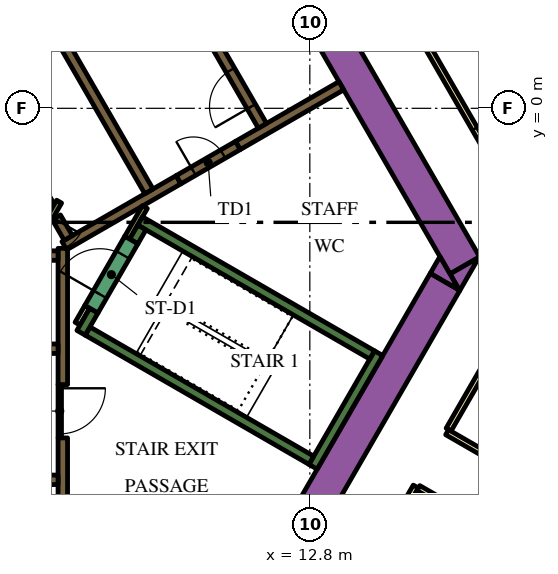
"""IFC4 building model, lengths in metres.
Left out: names, types, materials, properties, quantities, classifications, styles, units other than length and angle.
Written with IfcOpenShell. Run it as: python <this file> out.ifc"""

import sys

from ifc_helpers import new_model, si_unit, direction, frame, frame_2d, origin, place, context, subcontext, project, spatial, polyline, rectangle, outline, extrude, element, fill, save


model = new_model("IFC4")
c1 = context("Model", 3, precision=1e-05, world=origin(), true_north=direction((0.0, 1.0)))
c2 = subcontext(c1, "Body", "Model", "MODEL_VIEW")
j1 = project(units=[si_unit("LENGTHUNIT", "METRE"), si_unit("PLANEANGLEUNIT", "RADIAN")], contexts=[c1])
p1 = place(None, origin())
s1 = spatial("IfcSite", under=j1, at=p1, CompositionType="ELEMENT")
p2 = place(p1, origin())
s2 = spatial("IfcBuilding", under=s1, at=p2, CompositionType="ELEMENT")
p3 = place(p2, frame((0.0, 0.0, 74.4)))
s3 = spatial("IfcBuildingStorey", under=s2, at=p3, CompositionType="ELEMENT", Elevation=74.4)
p4 = place(p3, frame((6.461, 13.909, 0.0), z_axis=(0.0, 0.0, 1.0), x_axis=(0.500005804227, -0.866022052686, 0.0)))
e1 = element("IfcWall", 1, at=p4, inside=s3, PredefinedType="SOLIDWALL", context=c2, shape_type="SweptSolid", body=[
    extrude(rectangle(XDim=20.834, YDim=0.9, at=frame_2d((10.417, 0.0))), origin(), (0.0, 0.0, 1.0), 3.9),
])
p5 = place(p3, origin())
e2 = element("IfcWall", 2, at=p5, inside=s3, PredefinedType="SOLIDWALL", context=c2, shape_type="SweptSolid", body=[
    extrude(outline(polyline([(16.743, -4.8), (16.489, -4.36), (17.251, -3.92), (16.743, -4.8)])), origin(), (0.0, 0.0, 1.0), 3.9),
])
p6 = place(p3, frame((11.695, -12.644, 0.0), z_axis=(0.0, 0.0, 1.0), x_axis=(0.500010229568, 0.86601949766, 0.0)))
e3 = element("IfcWall", 3, at=p6, inside=s3, PredefinedType="SOLIDWALL", context=c2, shape_type="SweptSolid", body=[
    extrude(rectangle(XDim=9.326, YDim=0.9, at=frame_2d((4.663, 0.0))), origin(), (0.0, 0.0, 1.0), 3.9),
])
e4 = element("IfcWall", 4, at=p5, inside=s3, PredefinedType="SOLIDWALL", context=c2, shape_type="SweptSolid", body=[
    extrude(outline(polyline([(16.223, -3.9), (16.732, -4.78), (15.969, -4.34), (16.223, -3.9)])), origin(), (0.0, 0.0, 1.0), 3.9),
])
p7 = place(p3, frame((12.885, -9.431, 0.0), z_axis=(0.0, 0.0, 1.0), x_axis=(0.500020560727, 0.866013532718, 0.0)))
e5 = element("IfcWall", 5, at=p7, inside=s3, PredefinedType="SOLIDWALL", context=c2, shape_type="SweptSolid", body=[
    extrude(rectangle(XDim=3.45, YDim=0.25, at=frame_2d((1.725, 0.0))), origin(), (0.0, 0.0, 1.0), 3.9),
])
p8 = place(p3, frame((12.84, -9.261, 0.0), z_axis=(0.0, 0.0, 1.0), x_axis=(-0.866013990052, 0.500019768644, 0.0)))
e6 = element("IfcWall", 6, at=p8, inside=s3, PredefinedType="SOLIDWALL", context=c2, shape_type="SweptSolid", body=[
    extrude(rectangle(XDim=6.8, YDim=0.25, at=frame_2d((3.4, 0.0))), origin(), (0.0, 0.0, 1.0), 3.9),
])
p9 = place(p3, frame((6.78, -5.906, 0.0), z_axis=(0.0, 0.0, 1.0), x_axis=(0.500223362819, 0.865896406789, 0.0)))
e7 = element("IfcWall", 7, at=p9, inside=s3, PredefinedType="SOLIDWALL", context=c2, shape_type="SweptSolid", body=[
    extrude(rectangle(XDim=0.675, YDim=0.25, at=frame_2d((0.337, 0.0))), origin(), (0.0, 0.0, 1.0), 3.9),
])
p10 = place(p3, frame((8.334, -2.964, 0.0), z_axis=(0.0, 0.0, 1.0), x_axis=(0.866016039709, -0.500016218704, 0.0)))
e8 = element("IfcWall", 8, at=p10, inside=s3, PredefinedType="SOLIDWALL", context=c2, shape_type="SweptSolid", body=[
    extrude(rectangle(XDim=7.05, YDim=0.25, at=frame_2d((3.525, 0.0))), origin(), (0.0, 0.0, 1.0), 3.9),
])
p11 = place(p3, frame((8.168, -3.503, 0.0), z_axis=(0.0, 0.0, 1.0), x_axis=(0.49972245349, 0.866185586049, 0.0)))
e9 = element("IfcWall", 9, at=p11, inside=s3, PredefinedType="SOLIDWALL", context=c2, shape_type="SweptSolid", body=[
    extrude(rectangle(XDim=0.425, YDim=0.25, at=frame_2d((0.212, 0.0))), origin(), (0.0, 0.0, 1.0), 3.9),
])
p12 = place(p3, frame((6.3, -7.27, 0.0), z_axis=(0.0, 0.0, 1.0), x_axis=(0.0, 1.0, 0.0)))
e10 = element("IfcWall", 10, at=p12, inside=s3, PredefinedType="SOLIDWALL", context=c2, shape_type="SweptSolid", body=[
    extrude(rectangle(XDim=3.586, YDim=0.25, at=frame_2d((1.793, 0.0))), origin(), (0.0, 0.0, 1.0), 3.9),
])
p13 = place(p3, frame((6.3, -12.1, 0.0), z_axis=(0.0, 0.0, 1.0), x_axis=(0.0, 1.0, 0.0)))
e11 = element("IfcWall", 11, at=p13, inside=s3, PredefinedType="SOLIDWALL", context=c2, shape_type="SweptSolid", body=[
    extrude(rectangle(XDim=3.428, YDim=0.25, at=frame_2d((1.714, 0.0))), origin(), (0.0, 0.0, 1.0), 3.9),
])
p14 = place(p3, frame((5.538, -3.875, 0.0), z_axis=(0.0, 0.0, 1.0), x_axis=(1.0, 0.0, 0.0)))
e12 = element("IfcWall", 12, at=p14, inside=s3, PredefinedType="SOLIDWALL", context=c2, shape_type="SweptSolid", body=[
    extrude(rectangle(XDim=0.637, YDim=0.25, at=frame_2d((0.318, 0.0))), origin(), (0.0, 0.0, 1.0), 3.9),
])
p15 = place(p3, frame((13.629, 0.594, 0.0), z_axis=(0.0, 0.0, 1.0), x_axis=(-0.86602790099, -0.499995674689, 0.0)))
e13 = element("IfcWall", 13, at=p15, inside=s3, PredefinedType="SOLIDWALL", context=c2, shape_type="SweptSolid", body=[
    extrude(rectangle(XDim=3.146, YDim=0.25, at=frame_2d((1.573, 0.0))), origin(), (0.0, 0.0, 1.0), 3.9),
])
p16 = place(p3, frame((9.346, -1.879, 0.0), z_axis=(0.0, 0.0, 1.0), x_axis=(-0.866048528039, -0.499959945477, 0.0)))
e14 = element("IfcWall", 14, at=p16, inside=s3, PredefinedType="SOLIDWALL", context=c2, shape_type="SweptSolid", body=[
    extrude(rectangle(XDim=3.47, YDim=0.25, at=frame_2d((1.735, 0.0))), origin(), (0.0, 0.0, 1.0), 3.9),
])
p17 = place(p3, frame((6.13, -2.867, 0.0), z_axis=(0.0, 0.0, 1.0), x_axis=(0.500160776593, -0.865932559475, 0.0)))
e15 = element("IfcWall", 15, at=p17, inside=s3, PredefinedType="SOLIDWALL", context=c2, shape_type="SweptSolid", body=[
    extrude(rectangle(XDim=0.627, YDim=0.25, at=frame_2d((0.313, 0.0))), origin(), (0.0, 0.0, 1.0), 3.9),
])
p18 = place(p3, frame((5.97, -2.591, 0.0), z_axis=(0.0, 0.0, 1.0), x_axis=(-0.499994469932, 0.866028596547, 0.0)))
e16 = element("IfcWall", 16, at=p18, inside=s3, PredefinedType="SOLIDWALL", context=c2, shape_type="SweptSolid", body=[
    extrude(rectangle(XDim=10.488, YDim=0.25, at=frame_2d((5.244, 0.0))), origin(), (0.0, 0.0, 1.0), 3.9),
])
p19 = place(p3, frame((6.945, -5.222, 0.0), z_axis=(0.0, 0.0, 1.0), x_axis=(-0.499818422106, -0.866130212453, 0.0)))
e17 = element("IfcWall", 17, at=p19, inside=s3, PredefinedType="PARTITIONING", context=c2, shape_type="SweptSolid", body=[
    extrude(rectangle(XDim=0.514, YDim=0.15, at=frame_2d((0.257, 0.0))), origin(), (0.0, 0.0, 1.0), 2.7),
])
p20 = place(p3, frame((8.459, -2.599, 0.0), z_axis=(0.0, 0.0, 1.0), x_axis=(-0.500041054325, -0.866001699761, 0.0)))
e18 = element("IfcWall", 18, at=p20, inside=s3, PredefinedType="PARTITIONING", context=c2, shape_type="SweptSolid", body=[
    extrude(rectangle(XDim=0.929, YDim=0.15, at=frame_2d((0.464, 0.0))), origin(), (0.0, 0.0, 1.0), 3.9),
])
p21 = place(p3, frame((-6.175, -9.775, 0.0), z_axis=(0.0, 0.0, 1.0), x_axis=(1.0, 0.0, 0.0)))
e19 = element("IfcWall", 19, at=p21, inside=s3, PredefinedType="SOLIDWALL", context=c2, shape_type="SweptSolid", body=[
    extrude(rectangle(XDim=12.35, YDim=0.25, at=frame_2d((6.175, 0.0))), origin(), (0.0, 0.0, 1.0), 3.9),
])
p22 = place(p21, frame((0.585, 0.0, 0.0)))
e20 = element("IfcOpeningElement", 20, at=p22, cuts=e19, PredefinedType="OPENING", context=c2, shape_type="SweptSolid", body=[
    extrude(rectangle(XDim=1.1, YDim=2.1, at=frame_2d((0.55, 1.05))), frame((0.0, 0.135, 0.0), z_axis=(0.0, -1.0, 0.0), x_axis=(1.0, 0.0, 0.0)), (0.0, 0.0, 1.0), 0.27),
])
p23 = place(p21, frame((3.105, 0.0, 0.0)))
e21 = element("IfcOpeningElement", 21, at=p23, cuts=e19, PredefinedType="OPENING", context=c2, shape_type="SweptSolid", body=[
    extrude(rectangle(XDim=1.1, YDim=2.1, at=frame_2d((0.55, 1.05))), frame((0.0, 0.135, 0.0), z_axis=(0.0, -1.0, 0.0), x_axis=(1.0, 0.0, 0.0)), (0.0, 0.0, 1.0), 0.27),
])
p24 = place(p21, frame((5.625, 0.0, 0.0)))
e22 = element("IfcOpeningElement", 22, at=p24, cuts=e19, PredefinedType="OPENING", context=c2, shape_type="SweptSolid", body=[
    extrude(rectangle(XDim=1.1, YDim=2.1, at=frame_2d((0.55, 1.05))), frame((0.0, 0.135, 0.0), z_axis=(0.0, -1.0, 0.0), x_axis=(1.0, 0.0, 0.0)), (0.0, 0.0, 1.0), 0.27),
])
p25 = place(p21, frame((8.145, 0.0, 0.0)))
e23 = element("IfcOpeningElement", 23, at=p25, cuts=e19, PredefinedType="OPENING", context=c2, shape_type="SweptSolid", body=[
    extrude(rectangle(XDim=1.1, YDim=2.1, at=frame_2d((0.55, 1.05))), frame((0.0, 0.135, 0.0), z_axis=(0.0, -1.0, 0.0), x_axis=(1.0, 0.0, 0.0)), (0.0, 0.0, 1.0), 0.27),
])
p26 = place(p21, frame((10.665, 0.0, 0.0)))
e24 = element("IfcOpeningElement", 24, at=p26, cuts=e19, PredefinedType="OPENING", context=c2, shape_type="SweptSolid", body=[
    extrude(rectangle(XDim=1.1, YDim=2.1, at=frame_2d((0.55, 1.05))), frame((0.0, 0.135, 0.0), z_axis=(0.0, -1.0, 0.0), x_axis=(1.0, 0.0, 0.0)), (0.0, 0.0, 1.0), 0.27),
])
p27 = place(p3, frame((-6.175, -6.325, 0.0), z_axis=(0.0, 0.0, 1.0), x_axis=(1.0, 0.0, 0.0)))
e25 = element("IfcWall", 25, at=p27, inside=s3, PredefinedType="SOLIDWALL", context=c2, shape_type="SweptSolid", body=[
    extrude(rectangle(XDim=12.35, YDim=0.25, at=frame_2d((6.175, 0.0))), origin(), (0.0, 0.0, 1.0), 3.9),
])
p28 = place(p27, frame((3.205, 0.0, 0.0)))
e26 = element("IfcOpeningElement", 26, at=p28, cuts=e25, PredefinedType="OPENING", context=c2, shape_type="SweptSolid", body=[
    extrude(rectangle(XDim=0.9, YDim=2.1, at=frame_2d((0.45, 1.05))), frame((0.0, 0.135, 0.0), z_axis=(0.0, -1.0, 0.0), x_axis=(1.0, 0.0, 0.0)), (0.0, 0.0, 1.0), 0.27),
])
p29 = place(p27, frame((8.145, 0.0, 0.0)))
e27 = element("IfcOpeningElement", 27, at=p29, cuts=e25, PredefinedType="OPENING", context=c2, shape_type="SweptSolid", body=[
    extrude(rectangle(XDim=1.1, YDim=2.1, at=frame_2d((0.55, 1.05))), frame((0.0, 0.135, 0.0), z_axis=(0.0, -1.0, 0.0), x_axis=(1.0, 0.0, 0.0)), (0.0, 0.0, 1.0), 0.27),
])
p30 = place(p27, frame((10.665, 0.0, 0.0)))
e28 = element("IfcOpeningElement", 28, at=p30, cuts=e25, PredefinedType="OPENING", context=c2, shape_type="SweptSolid", body=[
    extrude(rectangle(XDim=1.1, YDim=2.1, at=frame_2d((0.55, 1.05))), frame((0.0, 0.135, 0.0), z_axis=(0.0, -1.0, 0.0), x_axis=(1.0, 0.0, 0.0)), (0.0, 0.0, 1.0), 0.27),
])
p31 = place(p3, frame((11.553, -0.46, 0.0), z_axis=(0.0, 0.0, 1.0), x_axis=(-0.500006514828, 0.866021642414, 0.0)))
e29 = element("IfcWall", 29, at=p31, inside=s3, PredefinedType="SOLIDWALL", context=c2, shape_type="SweptSolid", body=[
    extrude(rectangle(XDim=12.35, YDim=0.25, at=frame_2d((6.175, 0.0))), origin(), (0.0, 0.0, 1.0), 3.9),
])
p32 = place(p31, frame((0.585, 0.0, 0.0)))
e30 = element("IfcOpeningElement", 30, at=p32, cuts=e29, PredefinedType="OPENING", context=c2, shape_type="SweptSolid", body=[
    extrude(rectangle(XDim=1.1, YDim=2.1, at=frame_2d((0.55, 1.05))), frame((0.0, 0.135, 0.0), z_axis=(0.0, -1.0, 0.0), x_axis=(1.0, 0.0, 0.0)), (0.0, 0.0, 1.0), 0.27),
])
p33 = place(p31, frame((3.105, 0.0, 0.0)))
e31 = element("IfcOpeningElement", 31, at=p33, cuts=e29, PredefinedType="OPENING", context=c2, shape_type="SweptSolid", body=[
    extrude(rectangle(XDim=1.1, YDim=2.1, at=frame_2d((0.55, 1.05))), frame((0.0, 0.135, 0.0), z_axis=(0.0, -1.0, 0.0), x_axis=(1.0, 0.0, 0.0)), (0.0, 0.0, 1.0), 0.27),
])
p34 = place(p31, frame((5.625, 0.0, 0.0)))
e32 = element("IfcOpeningElement", 32, at=p34, cuts=e29, PredefinedType="OPENING", context=c2, shape_type="SweptSolid", body=[
    extrude(rectangle(XDim=1.1, YDim=2.1, at=frame_2d((0.55, 1.05))), frame((0.0, 0.135, 0.0), z_axis=(0.0, -1.0, 0.0), x_axis=(1.0, 0.0, 0.0)), (0.0, 0.0, 1.0), 0.27),
])
p35 = place(p3, frame((8.565, -2.185, 0.0), z_axis=(0.0, 0.0, 1.0), x_axis=(-0.499997954832, 0.866026584559, 0.0)))
e33 = element("IfcWall", 33, at=p35, inside=s3, PredefinedType="SOLIDWALL", context=c2, shape_type="SweptSolid", body=[
    extrude(rectangle(XDim=12.35, YDim=0.25, at=frame_2d((6.175, 0.0))), origin(), (0.0, 0.0, 1.0), 3.9),
])
p36 = place(p35, frame((5.725, 0.0, 0.0)))
e34 = element("IfcOpeningElement", 34, at=p36, cuts=e33, PredefinedType="OPENING", context=c2, shape_type="SweptSolid", body=[
    extrude(rectangle(XDim=0.9, YDim=2.1, at=frame_2d((0.45, 1.05))), frame((0.0, 0.135, 0.0), z_axis=(0.0, -1.0, 0.0), x_axis=(1.0, 0.0, 0.0)), (0.0, 0.0, 1.0), 0.27),
])
p37 = place(p3, frame((7.053, -5.284, 0.0), z_axis=(0.0, 0.0, 1.0), x_axis=(0.500078061341, 0.865980330357, 0.0)))
e35 = element("IfcWall", 35, at=p37, inside=s3, PredefinedType="SOLIDWALL", context=c2, shape_type="SweptSolid", body=[
    extrude(rectangle(XDim=2.1, YDim=0.4, at=frame_2d((1.05, 0.0))), origin(), (0.0, 0.0, 1.0), 3.9),
])
p38 = place(p37, frame((0.45, 0.0, 0.0)))
e36 = element("IfcOpeningElement", 36, at=p38, cuts=e35, PredefinedType="OPENING", context=c2, shape_type="SweptSolid", body=[
    extrude(rectangle(XDim=1.2, YDim=2.1, at=frame_2d((0.6, 1.05))), frame((0.0, 0.21, 0.0), z_axis=(0.0, -1.0, 0.0), x_axis=(1.0, 0.0, 0.0)), (0.0, 0.0, 1.0), 0.42),
])
p39 = place(p3, frame((9.346, -1.879, 0.0), z_axis=(0.0, 0.0, 1.0), x_axis=(0.866047807691, 0.499961193289, 0.0)))
e37 = element("IfcWall", 37, at=p39, inside=s3, PredefinedType="SOLIDWALL", context=c2, shape_type="SweptSolid", body=[
    extrude(rectangle(XDim=1.8, YDim=0.25, at=frame_2d((0.9, 0.0))), origin(), (0.0, 0.0, 1.0), 3.9),
])
p40 = place(p39, frame((0.45, 0.0, 0.0)))
e38 = element("IfcOpeningElement", 38, at=p40, cuts=e37, PredefinedType="OPENING", context=c2, shape_type="SweptSolid", body=[
    extrude(rectangle(XDim=0.9, YDim=2.1, at=frame_2d((0.45, 1.05))), frame((0.0, 0.135, 0.0), z_axis=(0.0, -1.0, 0.0), x_axis=(1.0, 0.0, 0.0)), (0.0, 0.0, 1.0), 0.27),
])
p41 = place(p3, frame((6.203, -2.456, 0.0), z_axis=(0.0, 0.0, 1.0), x_axis=(-0.500043961785, -0.866000020948, 0.0)))
e39 = element("IfcWall", 39, at=p41, inside=s3, PredefinedType="PARTITIONING", context=c2, shape_type="SweptSolid", body=[
    extrude(rectangle(XDim=1.95, YDim=0.15, at=frame_2d((0.975, 0.0))), origin(), (0.0, 0.0, 1.0), 3.9),
])
p42 = place(p41, frame((0.45, 0.0, 0.0)))
e40 = element("IfcOpeningElement", 40, at=p42, cuts=e39, PredefinedType="OPENING", context=c2, shape_type="SweptSolid", body=[
    extrude(rectangle(XDim=0.9, YDim=2.1, at=frame_2d((0.45, 1.05))), frame((0.0, 0.085, 0.0), z_axis=(0.0, -1.0, 0.0), x_axis=(1.0, 0.0, 0.0)), (0.0, 0.0, 1.0), 0.17),
])
p43 = place(p3, frame((6.22, -7.266, 0.0), z_axis=(0.0, 0.0, 1.0), x_axis=(0.0, -1.0, 0.0)))
e41 = element("IfcWall", 41, at=p43, inside=s3, PredefinedType="PARTITIONING", context=c2, shape_type="SweptSolid", body=[
    extrude(rectangle(XDim=1.4, YDim=0.09, at=frame_2d((0.7, 0.0))), origin(), (0.0, 0.0, 1.0), 2.7),
])
p44 = place(p43, frame((0.1, 0.0, 0.0)))
e42 = element("IfcOpeningElement", 42, at=p44, cuts=e41, PredefinedType="OPENING", context=c2, shape_type="SweptSolid", body=[
    extrude(rectangle(XDim=1.2, YDim=2.1, at=frame_2d((0.6, 1.05))), frame((0.0, 0.055, 0.0), z_axis=(0.0, -1.0, 0.0), x_axis=(1.0, 0.0, 0.0)), (0.0, 0.0, 1.0), 0.11),
])
p45 = place(p3, frame((16.412, -8.523, 0.0), z_axis=(0.0, 0.0, 1.0), x_axis=(0.866022197818, -0.500005552856, 0.0)))
e43 = element("IfcWall", 43, at=p45, inside=s3, PredefinedType="PARTITIONING", context=c2, shape_type="SweptSolid", body=[
    extrude(rectangle(XDim=16.224, YDim=0.15, at=frame_2d((8.112, 0.0))), origin(), (0.0, 0.0, 1.0), 2.7),
])
p46 = place(p45, frame((4.223, 0.0, 0.0)))
e44 = element("IfcOpeningElement", 44, at=p46, cuts=e43, PredefinedType="OPENING", context=c2, shape_type="SweptSolid", body=[
    extrude(rectangle(XDim=1.0, YDim=2.1, at=frame_2d((0.5, 1.05))), frame((0.0, 0.085, 0.0), z_axis=(0.0, -1.0, 0.0), x_axis=(1.0, 0.0, 0.0)), (0.0, 0.0, 1.0), 0.17),
])
p47 = place(p3, frame((19.081, -3.9, 0.0), z_axis=(0.0, 0.0, 1.0), x_axis=(-0.499974327079, -0.866040225545, 0.0)))
e45 = element("IfcWall", 45, at=p47, inside=s3, PredefinedType="PARTITIONING", context=c2, shape_type="SweptSolid", body=[
    extrude(rectangle(XDim=5.258, YDim=0.15, at=frame_2d((2.629, 0.0))), origin(), (0.0, 0.0, 1.0), 2.7),
])
p48 = place(p3, frame((6.163, 18.475, 0.0), z_axis=(0.0, 0.0, 1.0), x_axis=(0.500001317485, -0.866024643133, 0.0)))
e46 = element("IfcWall", 46, at=p48, inside=s3, PredefinedType="PARTITIONING", context=c2, shape_type="SweptSolid", body=[
    extrude(rectangle(XDim=25.767, YDim=0.15, at=frame_2d((12.883, 0.0))), origin(), (0.0, 0.0, 1.0), 2.7),
])
p49 = place(p48, frame((21.953, 0.0, 0.0)))
e47 = element("IfcOpeningElement", 47, at=p49, cuts=e46, PredefinedType="OPENING", context=c2, shape_type="SweptSolid", body=[
    extrude(rectangle(XDim=1.0, YDim=2.1, at=frame_2d((0.5, 1.05))), frame((0.0, 0.085, 0.0), z_axis=(0.0, -1.0, 0.0), x_axis=(1.0, 0.0, 0.0)), (0.0, 0.0, 1.0), 0.17),
])
p50 = place(p48, frame((9.948, 0.0, 0.0)))
e48 = element("IfcOpeningElement", 48, at=p50, cuts=e46, PredefinedType="OPENING", context=c2, shape_type="SweptSolid", body=[
    extrude(rectangle(XDim=1.0, YDim=2.1, at=frame_2d((0.5, 1.05))), frame((0.0, 0.085, 0.0), z_axis=(0.0, -1.0, 0.0), x_axis=(1.0, 0.0, 0.0)), (0.0, 0.0, 1.0), 0.17),
])
p51 = place(p48, frame((8.641, 0.0, 0.0)))
e49 = element("IfcOpeningElement", 49, at=p51, cuts=e46, PredefinedType="OPENING", context=c2, shape_type="SweptSolid", body=[
    extrude(rectangle(XDim=1.0, YDim=2.1, at=frame_2d((0.5, 1.05))), frame((0.0, 0.085, 0.0), z_axis=(0.0, -1.0, 0.0), x_axis=(1.0, 0.0, 0.0)), (0.0, 0.0, 1.0), 0.17),
])
p52 = place(p3, frame((15.587, -9.952, 0.0), z_axis=(0.0, 0.0, 1.0), x_axis=(-0.500016618951, -0.866015808616, 0.0)))
e50 = element("IfcWall", 50, at=p52, inside=s3, PredefinedType="PARTITIONING", context=c2, shape_type="SweptSolid", body=[
    extrude(rectangle(XDim=5.268, YDim=0.15, at=frame_2d((2.634, 0.0))), origin(), (0.0, 0.0, 1.0), 2.7),
])
p53 = place(p3, frame((29.638, -18.064, 0.0), z_axis=(0.0, 0.0, 1.0), x_axis=(-0.866026175601, 0.499998663172, 0.0)))
e51 = element("IfcWall", 51, at=p53, inside=s3, PredefinedType="PARTITIONING", context=c2, shape_type="SweptSolid", body=[
    extrude(rectangle(XDim=16.144, YDim=0.15, at=frame_2d((8.072, 0.0))), origin(), (0.0, 0.0, 1.0), 2.7),
])
p54 = place(p53, frame((14.714, 0.0, 0.0)))
e52 = element("IfcOpeningElement", 52, at=p54, cuts=e51, PredefinedType="OPENING", context=c2, shape_type="SweptSolid", body=[
    extrude(rectangle(XDim=1.0, YDim=2.1, at=frame_2d((0.5, 1.05))), frame((0.0, 0.085, 0.0), z_axis=(0.0, -1.0, 0.0), x_axis=(1.0, 0.0, 0.0)), (0.0, 0.0, 1.0), 0.17),
])
p55 = place(p53, frame((7.275, 0.0, 0.0)))
e53 = element("IfcOpeningElement", 53, at=p55, cuts=e51, PredefinedType="OPENING", context=c2, shape_type="SweptSolid", body=[
    extrude(rectangle(XDim=1.0, YDim=2.1, at=frame_2d((0.5, 1.05))), frame((0.0, 0.085, 0.0), z_axis=(0.0, -1.0, 0.0), x_axis=(1.0, 0.0, 0.0)), (0.0, 0.0, 1.0), 0.17),
])
p56 = place(p32, origin())
e54 = element("IfcDoor", 54, at=p56, inside=s3, OperationType="DOUBLE_DOOR_SLIDING", PredefinedType="DOOR", context=c2, shape_type="SweptSolid", body=[
    extrude(rectangle(XDim=1.1, YDim=2.1, at=frame_2d((0.55, 1.05))), frame((0.0, 0.025, 0.0), z_axis=(0.0, -1.0, 0.0), x_axis=(1.0, 0.0, 0.0)), (0.0, 0.0, 1.0), 0.05),
])
fill(e30, e54)
p57 = place(p38, origin())
e55 = element("IfcDoor", 55, at=p57, inside=s3, OperationType="SINGLE_SWING_LEFT", PredefinedType="DOOR", context=c2, shape_type="SweptSolid", body=[
    extrude(rectangle(XDim=1.2, YDim=2.1, at=frame_2d((0.6, 1.05))), frame((0.0, 0.025, 0.0), z_axis=(0.0, -1.0, 0.0), x_axis=(1.0, 0.0, 0.0)), (0.0, 0.0, 1.0), 0.05),
])
fill(e36, e55)
p58 = place(p40, origin())
e56 = element("IfcDoor", 56, at=p58, inside=s3, OperationType="SINGLE_SWING_LEFT", PredefinedType="DOOR", context=c2, shape_type="SweptSolid", body=[
    extrude(rectangle(XDim=0.9, YDim=2.1, at=frame_2d((0.45, 1.05))), frame((0.0, 0.025, 0.0), z_axis=(0.0, -1.0, 0.0), x_axis=(1.0, 0.0, 0.0)), (0.0, 0.0, 1.0), 0.05),
])
fill(e38, e56)
p59 = place(p44, origin())
e57 = element("IfcDoor", 57, at=p59, inside=s3, OperationType="SINGLE_SWING_LEFT", PredefinedType="DOOR", context=c2, shape_type="SweptSolid", body=[
    extrude(rectangle(XDim=1.2, YDim=2.1, at=frame_2d((0.6, 1.05))), frame((0.0, 0.025, 0.0), z_axis=(0.0, -1.0, 0.0), x_axis=(1.0, 0.0, 0.0)), (0.0, 0.0, 1.0), 0.05),
])
fill(e42, e57)
p60 = place(p49, origin())
e58 = element("IfcDoor", 58, at=p60, inside=s3, OperationType="SINGLE_SWING_LEFT", PredefinedType="DOOR", context=c2, shape_type="SweptSolid", body=[
    extrude(rectangle(XDim=1.0, YDim=2.1, at=frame_2d((0.5, 1.05))), frame((0.0, 0.025, 0.0), z_axis=(0.0, -1.0, 0.0), x_axis=(1.0, 0.0, 0.0)), (0.0, 0.0, 1.0), 0.05),
])
fill(e47, e58)
save(model, sys.argv[1])
